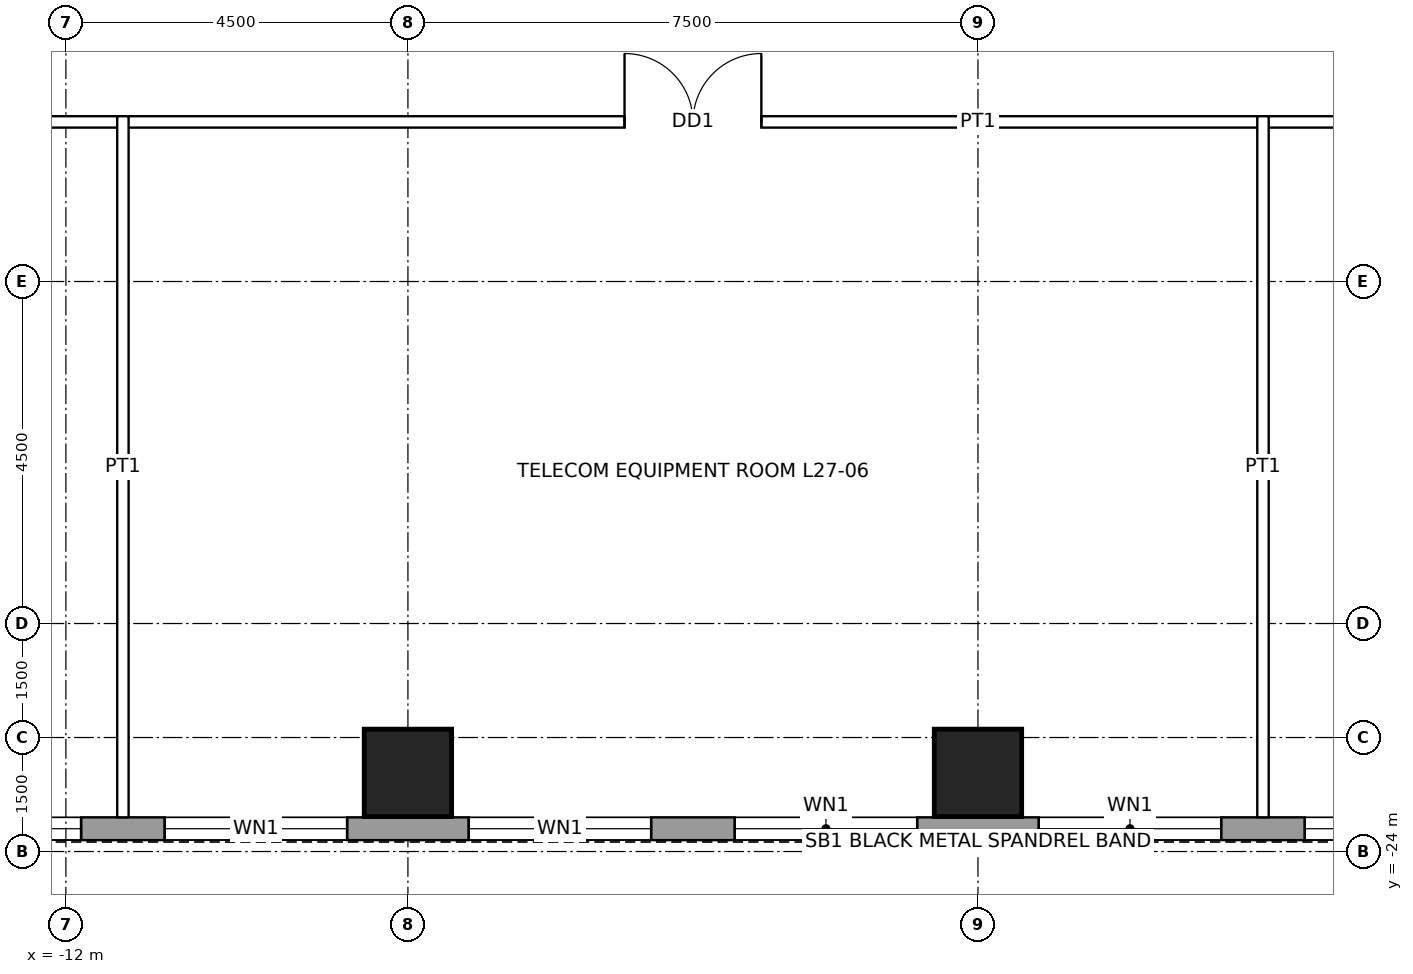
"""IFC4 building model, lengths in metres.
Left out: names, types, materials, properties, quantities, classifications, styles, units other than length and angle.
Written with IfcOpenShell. Run it as: python <this file> out.ifc"""

import sys

from ifc_helpers import new_model, si_unit, direction, frame, frame_2d, origin, origin_2d, place, context, subcontext, project, spatial, rectangle, hollow_rectangle, extrude, element, fill, save


model = new_model("IFC4")
c1 = context("Model", 3, precision=1e-05, world=origin(), true_north=direction((0.0, 1.0)))
c2 = subcontext(c1, "Body", "Model", "MODEL_VIEW")
j1 = project(units=[si_unit("LENGTHUNIT", "METRE"), si_unit("PLANEANGLEUNIT", "RADIAN")], contexts=[c1])
p1 = place(None, origin())
s1 = spatial("IfcSite", under=j1, at=p1, CompositionType="ELEMENT")
p2 = place(p1, origin())
s2 = spatial("IfcBuilding", under=s1, at=p2, CompositionType="ELEMENT")
p3 = place(p2, frame((0.0, 0.0, 135.9)))
s3 = spatial("IfcBuildingStorey", under=s2, at=p3, CompositionType="ELEMENT", Elevation=135.9)
for number, where, z_axis, x_axis in (
    (1, (0.0, -22.965, 0.0), (0.0, 0.0, 1.0), (1.0, 0.0, 0.0)),
    (2, (-7.5, -22.965, 0.0), (0.0, 0.0, 1.0), (1.0, 0.0, 0.0)),
):
    element("IfcColumn", number, at=place(p3, frame(where, z_axis=z_axis, x_axis=x_axis)), inside=s3, PredefinedType="COLUMN", context=c2, shape_type="SweptSolid", body=[
        extrude(hollow_rectangle(XDim=1.15, YDim=1.15, WallThickness=0.075, at=origin_2d()), origin(), (0.0, 0.0, 1.0), 4.5),
    ])
p4 = place(p3, frame((16.2, -23.7, 0.0), z_axis=(0.0, 0.0, 1.0), x_axis=(-1.0, 0.0, 0.0)))
e3 = element("IfcWall", 3, at=p4, inside=s3, PredefinedType="SOLIDWALL", context=c2, shape_type="SweptSolid", body=[
    extrude(rectangle(XDim=32.4, YDim=0.3, at=frame_2d((16.2, 0.0))), origin(), (0.0, 0.0, 1.0), 4.3),
])
p5 = place(p4, frame((2.0, 0.0, 1.0)))
e4 = element("IfcOpeningElement", 4, at=p5, cuts=e3, PredefinedType="OPENING", context=c2, shape_type="SweptSolid", body=[
    extrude(rectangle(XDim=2.4, YDim=1.2, at=frame_2d((1.2, 0.6))), frame((0.0, 0.16, 0.0), z_axis=(0.0, -1.0, 0.0), x_axis=(1.0, 0.0, 0.0)), (0.0, 0.0, 1.0), 0.32),
])
p6 = place(p4, frame((5.5, 0.0, 1.0)))
e5 = element("IfcOpeningElement", 5, at=p6, cuts=e3, PredefinedType="OPENING", context=c2, shape_type="SweptSolid", body=[
    extrude(rectangle(XDim=2.4, YDim=1.2, at=frame_2d((1.2, 0.6))), frame((0.0, 0.16, 0.0), z_axis=(0.0, -1.0, 0.0), x_axis=(1.0, 0.0, 0.0)), (0.0, 0.0, 1.0), 0.32),
])
p7 = place(p4, frame((9.5, 0.0, 1.0)))
e6 = element("IfcOpeningElement", 6, at=p7, cuts=e3, PredefinedType="OPENING", context=c2, shape_type="SweptSolid", body=[
    extrude(rectangle(XDim=2.4, YDim=1.2, at=frame_2d((1.2, 0.6))), frame((0.0, 0.16, 0.0), z_axis=(0.0, -1.0, 0.0), x_axis=(1.0, 0.0, 0.0)), (0.0, 0.0, 1.0), 0.32),
])
p8 = place(p4, frame((13.0, 0.0, 1.0)))
e7 = element("IfcOpeningElement", 7, at=p8, cuts=e3, PredefinedType="OPENING", context=c2, shape_type="SweptSolid", body=[
    extrude(rectangle(XDim=2.4, YDim=1.2, at=frame_2d((1.2, 0.6))), frame((0.0, 0.16, 0.0), z_axis=(0.0, -1.0, 0.0), x_axis=(1.0, 0.0, 0.0)), (0.0, 0.0, 1.0), 0.32),
])
p9 = place(p4, frame((17.0, 0.0, 1.0)))
e8 = element("IfcOpeningElement", 8, at=p9, cuts=e3, PredefinedType="OPENING", context=c2, shape_type="SweptSolid", body=[
    extrude(rectangle(XDim=2.4, YDim=1.2, at=frame_2d((1.2, 0.6))), frame((0.0, 0.16, 0.0), z_axis=(0.0, -1.0, 0.0), x_axis=(1.0, 0.0, 0.0)), (0.0, 0.0, 1.0), 0.32),
])
p10 = place(p4, frame((20.5, 0.0, 1.0)))
e9 = element("IfcOpeningElement", 9, at=p10, cuts=e3, PredefinedType="OPENING", context=c2, shape_type="SweptSolid", body=[
    extrude(rectangle(XDim=2.4, YDim=1.2, at=frame_2d((1.2, 0.6))), frame((0.0, 0.16, 0.0), z_axis=(0.0, -1.0, 0.0), x_axis=(1.0, 0.0, 0.0)), (0.0, 0.0, 1.0), 0.32),
])
p11 = place(p4, frame((24.5, 0.0, 1.0)))
e10 = element("IfcOpeningElement", 10, at=p11, cuts=e3, PredefinedType="OPENING", context=c2, shape_type="SweptSolid", body=[
    extrude(rectangle(XDim=2.4, YDim=1.2, at=frame_2d((1.2, 0.6))), frame((0.0, 0.16, 0.0), z_axis=(0.0, -1.0, 0.0), x_axis=(1.0, 0.0, 0.0)), (0.0, 0.0, 1.0), 0.32),
])
p12 = place(p4, frame((28.0, 0.0, 1.0)))
e11 = element("IfcOpeningElement", 11, at=p12, cuts=e3, PredefinedType="OPENING", context=c2, shape_type="SweptSolid", body=[
    extrude(rectangle(XDim=2.4, YDim=1.2, at=frame_2d((1.2, 0.6))), frame((0.0, 0.16, 0.0), z_axis=(0.0, -1.0, 0.0), x_axis=(1.0, 0.0, 0.0)), (0.0, 0.0, 1.0), 0.32),
])
p13 = place(p3, frame((-14.475, -14.4, 0.0), z_axis=(0.0, 0.0, 1.0), x_axis=(1.0, 0.0, 0.0)))
e12 = element("IfcWall", 12, at=p13, inside=s3, PredefinedType="PARTITIONING", context=c2, shape_type="SweptSolid", body=[
    extrude(rectangle(XDim=28.95, YDim=0.15, at=frame_2d((14.475, 0.0))), origin(), (0.0, 0.0, 1.0), 4.3),
])
p14 = place(p13, frame((21.075, 0.0, 0.0)))
e13 = element("IfcOpeningElement", 13, at=p14, cuts=e12, PredefinedType="OPENING", context=c2, shape_type="SweptSolid", body=[
    extrude(rectangle(XDim=1.8, YDim=2.4, at=frame_2d((0.9, 1.2))), frame((0.0, 0.085, 0.0), z_axis=(0.0, -1.0, 0.0), x_axis=(1.0, 0.0, 0.0)), (0.0, 0.0, 1.0), 0.17),
])
p15 = place(p13, frame((9.825, 0.0, 0.0)))
e14 = element("IfcOpeningElement", 14, at=p15, cuts=e12, PredefinedType="OPENING", context=c2, shape_type="SweptSolid", body=[
    extrude(rectangle(XDim=1.8, YDim=2.4, at=frame_2d((0.9, 1.2))), frame((0.0, 0.085, 0.0), z_axis=(0.0, -1.0, 0.0), x_axis=(1.0, 0.0, 0.0)), (0.0, 0.0, 1.0), 0.17),
])
p16 = place(p13, frame((26.8, 0.0, 0.0)))
e15 = element("IfcOpeningElement", 15, at=p16, cuts=e12, PredefinedType="OPENING", context=c2, shape_type="SweptSolid", body=[
    extrude(rectangle(XDim=1.0, YDim=2.1, at=frame_2d((0.5, 1.05))), frame((0.0, 0.085, 0.0), z_axis=(0.0, -1.0, 0.0), x_axis=(1.0, 0.0, 0.0)), (0.0, 0.0, 1.0), 0.17),
])
p17 = place(p13, frame((1.15, 0.0, 0.0)))
e16 = element("IfcOpeningElement", 16, at=p17, cuts=e12, PredefinedType="OPENING", context=c2, shape_type="SweptSolid", body=[
    extrude(rectangle(XDim=1.0, YDim=2.1, at=frame_2d((0.5, 1.05))), frame((0.0, 0.085, 0.0), z_axis=(0.0, -1.0, 0.0), x_axis=(1.0, 0.0, 0.0)), (0.0, 0.0, 1.0), 0.17),
])
for number, where, z_axis, x_axis in (
    (17, (-11.25, -23.55, 0.0), (0.0, 0.0, 1.0), (0.0, 1.0, 0.0)),
    (18, (3.75, -23.55, 0.0), (0.0, 0.0, 1.0), (0.0, 1.0, 0.0)),
):
    element("IfcWall", number, at=place(p3, frame(where, z_axis=z_axis, x_axis=x_axis)), inside=s3, PredefinedType="PARTITIONING", context=c2, shape_type="SweptSolid", body=[
        extrude(rectangle(XDim=9.225, YDim=0.15, at=frame_2d((4.613, 0.0))), origin(), (0.0, 0.0, 1.0), 3.431),
    ])
p18 = place(p7, origin())
e19 = element("IfcWindow", 19, at=p18, inside=s3, PartitioningType="SINGLE_PANEL", PredefinedType="WINDOW", context=c2, shape_type="SweptSolid", body=[
    extrude(rectangle(XDim=2.4, YDim=1.2, at=frame_2d((1.2, 0.6))), frame((0.0, 0.03, 0.0), z_axis=(0.0, -1.0, 0.0), x_axis=(1.0, 0.0, 0.0)), (0.0, 0.0, 1.0), 0.06),
])
fill(e6, e19)
p19 = place(p8, origin())
e20 = element("IfcWindow", 20, at=p19, inside=s3, PartitioningType="SINGLE_PANEL", PredefinedType="WINDOW", context=c2, shape_type="SweptSolid", body=[
    extrude(rectangle(XDim=2.4, YDim=1.2, at=frame_2d((1.2, 0.6))), frame((0.0, 0.03, 0.0), z_axis=(0.0, -1.0, 0.0), x_axis=(1.0, 0.0, 0.0)), (0.0, 0.0, 1.0), 0.06),
])
fill(e7, e20)
p20 = place(p9, origin())
e21 = element("IfcWindow", 21, at=p20, inside=s3, PartitioningType="SINGLE_PANEL", PredefinedType="WINDOW", context=c2, shape_type="SweptSolid", body=[
    extrude(rectangle(XDim=2.4, YDim=1.2, at=frame_2d((1.2, 0.6))), frame((0.0, 0.03, 0.0), z_axis=(0.0, -1.0, 0.0), x_axis=(1.0, 0.0, 0.0)), (0.0, 0.0, 1.0), 0.06),
])
fill(e8, e21)
p21 = place(p10, origin())
e22 = element("IfcWindow", 22, at=p21, inside=s3, PartitioningType="SINGLE_PANEL", PredefinedType="WINDOW", context=c2, shape_type="SweptSolid", body=[
    extrude(rectangle(XDim=2.4, YDim=1.2, at=frame_2d((1.2, 0.6))), frame((0.0, 0.03, 0.0), z_axis=(0.0, -1.0, 0.0), x_axis=(1.0, 0.0, 0.0)), (0.0, 0.0, 1.0), 0.06),
])
fill(e9, e22)
p22 = place(p11, origin())
e23 = element("IfcWindow", 23, at=p22, inside=s3, PartitioningType="SINGLE_PANEL", PredefinedType="WINDOW", context=c2, shape_type="SweptSolid", body=[
    extrude(rectangle(XDim=2.4, YDim=1.2, at=frame_2d((1.2, 0.6))), frame((0.0, 0.03, 0.0), z_axis=(0.0, -1.0, 0.0), x_axis=(1.0, 0.0, 0.0)), (0.0, 0.0, 1.0), 0.06),
])
fill(e10, e23)
p23 = place(p12, origin())
e24 = element("IfcWindow", 24, at=p23, inside=s3, PartitioningType="SINGLE_PANEL", PredefinedType="WINDOW", context=c2, shape_type="SweptSolid", body=[
    extrude(rectangle(XDim=2.4, YDim=1.2, at=frame_2d((1.2, 0.6))), frame((0.0, 0.03, 0.0), z_axis=(0.0, -1.0, 0.0), x_axis=(1.0, 0.0, 0.0)), (0.0, 0.0, 1.0), 0.06),
])
fill(e11, e24)
p24 = place(p15, origin())
e25 = element("IfcDoor", 25, at=p24, inside=s3, OperationType="DOUBLE_DOOR_SINGLE_SWING", PredefinedType="DOOR", context=c2, shape_type="SweptSolid", body=[
    extrude(rectangle(XDim=1.8, YDim=2.4, at=frame_2d((0.9, 1.2))), frame((0.0, 0.025, 0.0), z_axis=(0.0, -1.0, 0.0), x_axis=(1.0, 0.0, 0.0)), (0.0, 0.0, 1.0), 0.05),
])
fill(e14, e25)
save(model, sys.argv[1])
